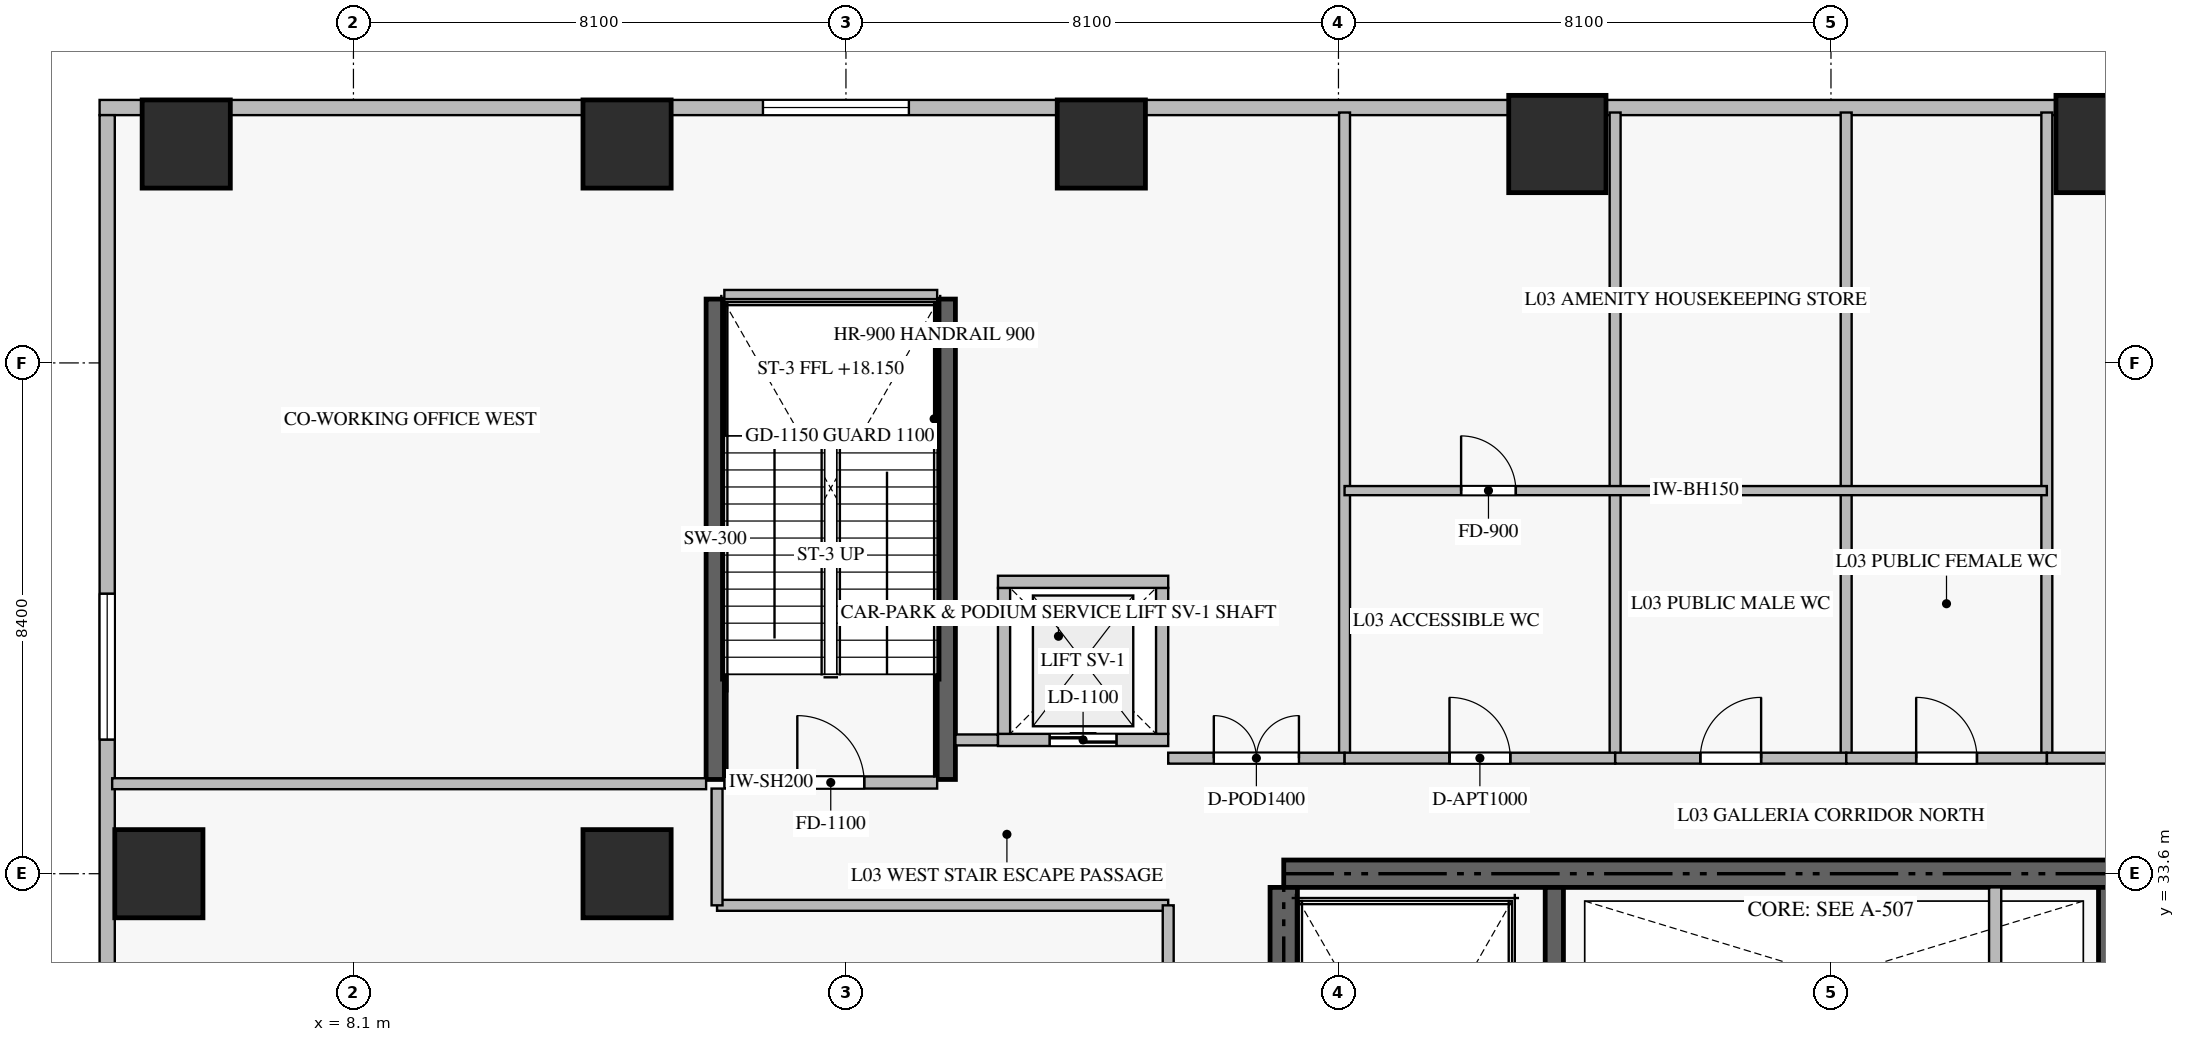
"""IFC4 building model, lengths in metres.
Left out: names, types, materials, properties, quantities, classifications, styles, units other than length and angle.
Written with IfcOpenShell. Run it as: python <this file> out.ifc"""

import sys

from ifc_helpers import new_model, si_unit, direction, frame, frame_2d, origin, origin_2d, place, context, subcontext, project, spatial, rectangle, extrude, source, transform, mapped, element, fill, save


model = new_model("IFC4")
c1 = context("Model", 3, precision=1e-05, world=origin(), true_north=direction((0.0, 1.0)))
c2 = subcontext(c1, "Body", "Model", "MODEL_VIEW")
j1 = project(units=[si_unit("LENGTHUNIT", "METRE"), si_unit("PLANEANGLEUNIT", "RADIAN")], contexts=[c1])
p1 = place(None, origin())
s1 = spatial("IfcSite", under=j1, at=p1, CompositionType="ELEMENT")
p2 = place(p1, origin())
s2 = spatial("IfcBuilding", under=s1, at=p2, CompositionType="ELEMENT")
p3 = place(p2, frame((0.0, 0.0, 15.3)))
s3 = spatial("IfcBuildingStorey", under=s2, at=p3, CompositionType="ELEMENT", Elevation=15.3)
p4 = place(p3, frame((41.4, 33.6, -0.38), z_axis=(0.0, 0.0, 1.0), x_axis=(-1.0, 0.0, 0.0)))
e1 = element("IfcWall", 1, at=p4, inside=s3, PredefinedType="SHEAR", context=c2, shape_type="SweptSolid", body=[
    extrude(rectangle(XDim=18.0, YDim=0.45, at=frame_2d((9.0, 0.0))), origin(), (0.0, 0.0, 1.0), 5.228),
])
p5 = place(p3, frame((23.4, 24.25, -0.38), z_axis=(0.0, 0.0, 1.0), x_axis=(0.0, 1.0, 0.0)))
e2 = element("IfcWall", 2, at=p5, inside=s3, PredefinedType="SHEAR", context=c2, shape_type="SweptSolid", body=[
    extrude(rectangle(XDim=9.125, YDim=0.45, at=frame_2d((4.562, 0.0))), origin(), (0.0, 0.0, 1.0), 5.228),
])
p6 = place(p3, frame((27.85, 23.55, -0.38), z_axis=(0.0, 0.0, 1.0), x_axis=(0.0, 1.0, 0.0)))
e3 = element("IfcWall", 3, at=p6, inside=s3, PredefinedType="SHEAR", context=c2, shape_type="SweptSolid", body=[
    extrude(rectangle(XDim=9.825, YDim=0.3, at=frame_2d((4.913, 0.0))), origin(), (0.0, 0.0, 1.0), 5.228),
])
p7 = place(p3, frame((36.95, 27.05, -0.38), z_axis=(0.0, 0.0, 1.0), x_axis=(0.0, 1.0, 0.0)))
e4 = element("IfcWall", 4, at=p7, inside=s3, PredefinedType="SHEAR", context=c2, shape_type="SweptSolid", body=[
    extrude(rectangle(XDim=6.325, YDim=0.3, at=frame_2d((3.163, 0.0))), origin(), (0.0, 0.0, 1.0), 5.228),
])
m1 = source(origin(), c2, "Body", "SweptSolid", [
    extrude(rectangle(XDim=1.45, YDim=1.45, at=origin_2d()), origin(), (0.0, 0.0, 1.0), 5.23),
])
for number, where, z_axis, x_axis in (
    (5, (12.6, 45.6, -0.38), (0.0, 0.0, 1.0), (1.0, 0.0, 0.0)),
    (6, (20.4, 45.6, -0.38), (0.0, 0.0, 1.0), (1.0, 0.0, 0.0)),
):
    element("IfcColumn", number, at=place(p3, frame(where, z_axis=z_axis, x_axis=x_axis)), inside=s3, PredefinedType="COLUMN", context=c2, shape_type="MappedRepresentation", body=[
        mapped(m1, transform((0.0, 0.0, 0.0), scale=1.0)),
    ])
m2 = source(origin(), c2, "Body", "SweptSolid", [
    extrude(rectangle(XDim=1.6, YDim=1.6, at=origin_2d()), origin(), (0.0, 0.0, 1.0), 5.23),
])
for number, where, z_axis, x_axis in (
    (7, (27.9, 45.6, -0.38), (0.0, 0.0, 1.0), (1.0, 0.0, 0.0)),
    (8, (36.9, 45.6, -0.38), (0.0, 0.0, 1.0), (1.0, 0.0, 0.0)),
):
    element("IfcColumn", number, at=place(p3, frame(where, z_axis=z_axis, x_axis=x_axis)), inside=s3, PredefinedType="COLUMN", context=c2, shape_type="MappedRepresentation", body=[
        mapped(m2, transform((0.0, 0.0, 0.0), scale=1.0)),
    ])
for number, where, z_axis, x_axis in (
    (9, (12.6, 33.6, -0.38), (0.0, 0.0, 1.0), (1.0, 0.0, 0.0)),
    (10, (4.9, 33.6, -0.38), (0.0, 0.0, 1.0), (1.0, 0.0, 0.0)),
    (11, (5.35, 45.6, -0.38), (0.0, 0.0, 1.0), (1.0, 0.0, 0.0)),
):
    element("IfcColumn", number, at=place(p3, frame(where, z_axis=z_axis, x_axis=x_axis)), inside=s3, PredefinedType="COLUMN", context=c2, shape_type="MappedRepresentation", body=[
        mapped(m1, transform((0.0, 0.0, 0.0), scale=1.0)),
    ])
p8 = place(p3, frame((60.875, 46.2, 0.0), z_axis=(0.0, 0.0, 1.0), x_axis=(-1.0, 0.0, 0.0)))
e12 = element("IfcWall", 12, at=p8, inside=s3, PredefinedType="ELEMENTEDWALL", context=c2, shape_type="SweptSolid", body=[
    extrude(rectangle(XDim=56.95, YDim=0.25, at=frame_2d((28.475, 0.0))), origin(), (0.0, 0.0, 1.0), 4.835),
])
p9 = place(p8, frame((10.91, 0.0, 0.6)))
e13 = element("IfcOpeningElement", 13, at=p9, cuts=e12, PredefinedType="OPENING", context=c2, shape_type="SweptSolid", body=[
    extrude(rectangle(XDim=2.4, YDim=2.6, at=frame_2d((1.2, 1.3))), frame((0.0, 0.135, 0.0), z_axis=(0.0, -1.0, 0.0), x_axis=(1.0, 0.0, 0.0)), (0.0, 0.0, 1.0), 0.27),
])
p10 = place(p8, frame((43.64, 0.0, 0.6)))
e14 = element("IfcOpeningElement", 14, at=p10, cuts=e12, PredefinedType="OPENING", context=c2, shape_type="SweptSolid", body=[
    extrude(rectangle(XDim=2.4, YDim=2.6, at=frame_2d((1.2, 1.3))), frame((0.0, 0.135, 0.0), z_axis=(0.0, -1.0, 0.0), x_axis=(1.0, 0.0, 0.0)), (0.0, 0.0, 1.0), 0.27),
])
p11 = place(p3, frame((4.05, 46.075, 0.0), z_axis=(0.0, 0.0, 1.0), x_axis=(0.0, -1.0, 0.0)))
e15 = element("IfcWall", 15, at=p11, inside=s3, PredefinedType="ELEMENTEDWALL", context=c2, shape_type="SweptSolid", body=[
    extrude(rectangle(XDim=41.75, YDim=0.25, at=frame_2d((20.875, 0.0))), origin(), (0.0, 0.0, 1.0), 4.835),
])
p12 = place(p11, frame((7.87, 0.0, 0.6)))
e16 = element("IfcOpeningElement", 16, at=p12, cuts=e15, PredefinedType="OPENING", context=c2, shape_type="SweptSolid", body=[
    extrude(rectangle(XDim=2.4, YDim=2.6, at=frame_2d((1.2, 1.3))), frame((0.0, 0.135, 0.0), z_axis=(0.0, -1.0, 0.0), x_axis=(1.0, 0.0, 0.0)), (0.0, 0.0, 1.0), 0.27),
])
p13 = place(p11, frame((24.397, 0.0, 0.6)))
e17 = element("IfcOpeningElement", 17, at=p13, cuts=e15, PredefinedType="OPENING", context=c2, shape_type="SweptSolid", body=[
    extrude(rectangle(XDim=2.4, YDim=2.6, at=frame_2d((1.2, 1.3))), frame((0.0, 0.135, 0.0), z_axis=(0.0, -1.0, 0.0), x_axis=(1.0, 0.0, 0.0)), (0.0, 0.0, 1.0), 0.27),
])
for number, where, z_axis, x_axis in (
    (18, (14.05, 35.15, -0.38), (0.0, 0.0, 1.0), (0.0, 1.0, 0.0)),
    (19, (17.85, 35.15, -0.38), (0.0, 0.0, 1.0), (0.0, 1.0, 0.0)),
):
    element("IfcWall", number, at=place(p3, frame(where, z_axis=z_axis, x_axis=x_axis)), inside=s3, PredefinedType="SHEAR", context=c2, shape_type="SweptSolid", body=[
        extrude(rectangle(XDim=7.9, YDim=0.3, at=frame_2d((3.95, 0.0))), origin(), (0.0, 0.0, 1.0), 5.228),
    ])
p14 = place(p3, frame((14.2, 35.1, 0.0), z_axis=(0.0, 0.0, 1.0), x_axis=(1.0, 0.0, 0.0)))
e20 = element("IfcWall", 20, at=p14, inside=s3, PredefinedType="STANDARD", context=c2, shape_type="SweptSolid", body=[
    extrude(rectangle(XDim=3.5, YDim=0.2, at=frame_2d((1.75, 0.0))), origin(), (0.0, 0.0, 1.0), 4.85),
])
p15 = place(p14, frame((1.2, 0.0, 0.0)))
e21 = element("IfcOpeningElement", 21, at=p15, cuts=e20, PredefinedType="OPENING", context=c2, shape_type="SweptSolid", body=[
    extrude(rectangle(XDim=1.1, YDim=2.15, at=frame_2d((0.55, 1.075))), frame((0.0, 0.11, 0.0), z_axis=(0.0, -1.0, 0.0), x_axis=(1.0, 0.0, 0.0)), (0.0, 0.0, 1.0), 0.22),
])
p16 = place(p3, frame((14.2, 43.1, 0.0), z_axis=(0.0, 0.0, 1.0), x_axis=(1.0, 0.0, 0.0)))
e22 = element("IfcWall", 22, at=p16, inside=s3, PredefinedType="STANDARD", context=c2, shape_type="SweptSolid", body=[
    extrude(rectangle(XDim=3.5, YDim=0.2, at=frame_2d((1.75, 0.0))), origin(), (0.0, 0.0, 1.0), 2.335),
])
p17 = place(p3, frame((35.1, 30.75, 0.0), z_axis=(0.0, 0.0, 1.0), x_axis=(0.0, 1.0, 0.0)))
e23 = element("IfcWall", 23, at=p17, inside=s3, PredefinedType="STANDARD", context=c2, shape_type="SweptSolid", body=[
    extrude(rectangle(XDim=2.625, YDim=0.2, at=frame_2d((1.312, 0.0))), origin(), (0.0, 0.0, 1.0), 4.85),
])
p18 = place(p3, frame((18.7, 35.8, 0.0), z_axis=(0.0, 0.0, 1.0), x_axis=(1.0, 0.0, 0.0)))
e24 = element("IfcWall", 24, at=p18, inside=s3, PredefinedType="STANDARD", context=c2, shape_type="SweptSolid", body=[
    extrude(rectangle(XDim=2.8, YDim=0.2, at=frame_2d((1.4, 0.0))), origin(), (0.0, 0.0, 1.0), 4.85),
])
p19 = place(p18, frame((0.85, 0.0, 0.0)))
e25 = element("IfcOpeningElement", 25, at=p19, cuts=e24, PredefinedType="OPENING", context=c2, shape_type="SweptSolid", body=[
    extrude(rectangle(XDim=1.1, YDim=2.2, at=frame_2d((0.55, 1.1))), frame((0.0, 0.11, 0.0), z_axis=(0.0, -1.0, 0.0), x_axis=(1.0, 0.0, 0.0)), (0.0, 0.0, 1.0), 0.22),
])
for number, where, z_axis, x_axis in (
    (26, (18.8, 35.9, 0.0), (0.0, 0.0, 1.0), (0.0, 1.0, 0.0)),
    (27, (21.4, 35.9, 0.0), (0.0, 0.0, 1.0), (0.0, 1.0, 0.0)),
):
    element("IfcWall", number, at=place(p3, frame(where, z_axis=z_axis, x_axis=x_axis)), inside=s3, PredefinedType="STANDARD", context=c2, shape_type="SweptSolid", body=[
        extrude(rectangle(XDim=2.4, YDim=0.2, at=frame_2d((1.2, 0.0))), origin(), (0.0, 0.0, 1.0), 4.85),
    ])
p20 = place(p3, frame((18.7, 38.4, 0.0), z_axis=(0.0, 0.0, 1.0), x_axis=(1.0, 0.0, 0.0)))
e28 = element("IfcWall", 28, at=p20, inside=s3, PredefinedType="STANDARD", context=c2, shape_type="SweptSolid", body=[
    extrude(rectangle(XDim=2.8, YDim=0.2, at=frame_2d((1.4, 0.0))), origin(), (0.0, 0.0, 1.0), 4.85),
])
p21 = place(p3, frame((4.132, 35.08, 0.0), z_axis=(0.0, 0.0, 1.0), x_axis=(1.0, 0.0, 0.0)))
e29 = element("IfcWall", 29, at=p21, inside=s3, PredefinedType="PARTITIONING", context=c2, shape_type="SweptSolid", body=[
    extrude(rectangle(XDim=9.768, YDim=0.18, at=frame_2d((4.884, 0.0))), origin(), (0.0, 0.0, 1.0), 4.85),
])
p22 = place(p3, frame((14.08, 33.08, 0.0), z_axis=(0.0, 0.0, 1.0), x_axis=(1.0, 0.0, 0.0)))
e30 = element("IfcWall", 30, at=p22, inside=s3, PredefinedType="PARTITIONING", context=c2, shape_type="SweptSolid", body=[
    extrude(rectangle(XDim=7.42, YDim=0.18, at=frame_2d((3.71, 0.0))), origin(), (0.0, 0.0, 1.0), 4.85),
])
p23 = place(p3, frame((18.0, 35.8, 0.0), z_axis=(0.0, 0.0, 1.0), x_axis=(1.0, 0.0, 0.0)))
e31 = element("IfcWall", 31, at=p23, inside=s3, PredefinedType="PARTITIONING", context=c2, shape_type="SweptSolid", body=[
    extrude(rectangle(XDim=0.698, YDim=0.18, at=frame_2d((0.349, 0.0))), origin(), (0.0, 0.0, 1.0), 4.85),
])
p24 = place(p3, frame((14.08, 33.08, 0.0), z_axis=(0.0, 0.0, 1.0), x_axis=(0.0, 1.0, 0.0)))
e32 = element("IfcWall", 32, at=p24, inside=s3, PredefinedType="PARTITIONING", context=c2, shape_type="SweptSolid", body=[
    extrude(rectangle(XDim=1.92, YDim=0.18, at=frame_2d((0.96, 0.0))), origin(), (0.0, 0.0, 1.0), 4.85),
])
p25 = place(p3, frame((21.5, 14.9, 0.0), z_axis=(0.0, 0.0, 1.0), x_axis=(0.0, 1.0, 0.0)))
e33 = element("IfcWall", 33, at=p25, inside=s3, PredefinedType="PARTITIONING", context=c2, shape_type="SweptSolid", body=[
    extrude(rectangle(XDim=18.18, YDim=0.18, at=frame_2d((9.09, 0.0))), origin(), (0.0, 0.0, 1.0), 4.85),
])
p26 = place(p25, frame((8.34, 0.0, 0.0)))
e34 = element("IfcOpeningElement", 34, at=p26, cuts=e33, PredefinedType="OPENING", context=c2, shape_type="SweptSolid", body=[
    extrude(rectangle(XDim=1.5, YDim=2.25, at=frame_2d((0.75, 1.125))), frame((0.0, 0.1, 0.0), z_axis=(0.0, -1.0, 0.0), x_axis=(1.0, 0.0, 0.0)), (0.0, 0.0, 1.0), 0.2),
])
for number, where, z_axis, x_axis in (
    (35, (24.4, 35.5, 0.0), (0.0, 0.0, 1.0), (0.0, 1.0, 0.0)),
    (36, (28.85, 35.5, 0.0), (0.0, 0.0, 1.0), (0.0, 1.0, 0.0)),
    (37, (32.65, 35.5, 0.0), (0.0, 0.0, 1.0), (0.0, 1.0, 0.0)),
    (38, (35.95, 35.5, 0.0), (0.0, 0.0, 1.0), (0.0, 1.0, 0.0)),
):
    element("IfcWall", number, at=place(p3, frame(where, z_axis=z_axis, x_axis=x_axis)), inside=s3, PredefinedType="PARTITIONING", context=c2, shape_type="SweptSolid", body=[
        extrude(rectangle(XDim=10.618, YDim=0.18, at=frame_2d((5.309, 0.0))), origin(), (0.0, 0.0, 1.0), 4.85),
    ])
p27 = place(p3, frame((21.5, 35.5, 0.0), z_axis=(0.0, 0.0, 1.0), x_axis=(1.0, 0.0, 0.0)))
e39 = element("IfcWall", 39, at=p27, inside=s3, PredefinedType="PARTITIONING", context=c2, shape_type="SweptSolid", body=[
    extrude(rectangle(XDim=2.9, YDim=0.18, at=frame_2d((1.45, 0.0))), origin(), (0.0, 0.0, 1.0), 4.85),
])
p28 = place(p27, frame((0.75, 0.0, 0.0)))
e40 = element("IfcOpeningElement", 40, at=p28, cuts=e39, PredefinedType="OPENING", context=c2, shape_type="SweptSolid", body=[
    extrude(rectangle(XDim=1.4, YDim=2.25, at=frame_2d((0.7, 1.125))), frame((0.0, 0.1, 0.0), z_axis=(0.0, -1.0, 0.0), x_axis=(1.0, 0.0, 0.0)), (0.0, 0.0, 1.0), 0.2),
])
p29 = place(p3, frame((24.402, 35.5, 0.0), z_axis=(0.0, 0.0, 1.0), x_axis=(1.0, 0.0, 0.0)))
e41 = element("IfcWall", 41, at=p29, inside=s3, PredefinedType="PARTITIONING", context=c2, shape_type="SweptSolid", body=[
    extrude(rectangle(XDim=4.448, YDim=0.18, at=frame_2d((2.224, 0.0))), origin(), (0.0, 0.0, 1.0), 4.85),
])
p30 = place(p29, frame((1.724, 0.0, 0.0)))
e42 = element("IfcOpeningElement", 42, at=p30, cuts=e41, PredefinedType="OPENING", context=c2, shape_type="SweptSolid", body=[
    extrude(rectangle(XDim=1.0, YDim=2.15, at=frame_2d((0.5, 1.075))), frame((0.0, 0.1, 0.0), z_axis=(0.0, -1.0, 0.0), x_axis=(1.0, 0.0, 0.0)), (0.0, 0.0, 1.0), 0.2),
])
p31 = place(p3, frame((28.852, 35.5, 0.0), z_axis=(0.0, 0.0, 1.0), x_axis=(1.0, 0.0, 0.0)))
e43 = element("IfcWall", 43, at=p31, inside=s3, PredefinedType="PARTITIONING", context=c2, shape_type="SweptSolid", body=[
    extrude(rectangle(XDim=3.798, YDim=0.18, at=frame_2d((1.899, 0.0))), origin(), (0.0, 0.0, 1.0), 4.85),
])
p32 = place(p31, frame((1.399, 0.0, 0.0)))
e44 = element("IfcOpeningElement", 44, at=p32, cuts=e43, PredefinedType="OPENING", context=c2, shape_type="SweptSolid", body=[
    extrude(rectangle(XDim=1.0, YDim=2.15, at=frame_2d((0.5, 1.075))), frame((0.0, 0.1, 0.0), z_axis=(0.0, -1.0, 0.0), x_axis=(1.0, 0.0, 0.0)), (0.0, 0.0, 1.0), 0.2),
])
p33 = place(p3, frame((32.652, 35.5, 0.0), z_axis=(0.0, 0.0, 1.0), x_axis=(1.0, 0.0, 0.0)))
e45 = element("IfcWall", 45, at=p33, inside=s3, PredefinedType="PARTITIONING", context=c2, shape_type="SweptSolid", body=[
    extrude(rectangle(XDim=3.298, YDim=0.18, at=frame_2d((1.649, 0.0))), origin(), (0.0, 0.0, 1.0), 4.85),
])
p34 = place(p33, frame((1.149, 0.0, 0.0)))
e46 = element("IfcOpeningElement", 46, at=p34, cuts=e45, PredefinedType="OPENING", context=c2, shape_type="SweptSolid", body=[
    extrude(rectangle(XDim=1.0, YDim=2.15, at=frame_2d((0.5, 1.075))), frame((0.0, 0.1, 0.0), z_axis=(0.0, -1.0, 0.0), x_axis=(1.0, 0.0, 0.0)), (0.0, 0.0, 1.0), 0.2),
])
p35 = place(p3, frame((35.952, 35.5, 0.0), z_axis=(0.0, 0.0, 1.0), x_axis=(1.0, 0.0, 0.0)))
e47 = element("IfcWall", 47, at=p35, inside=s3, PredefinedType="PARTITIONING", context=c2, shape_type="SweptSolid", body=[
    extrude(rectangle(XDim=7.348, YDim=0.18, at=frame_2d((3.674, 0.0))), origin(), (0.0, 0.0, 1.0), 4.85),
])
p36 = place(p35, frame((2.974, 0.0, 0.0)))
e48 = element("IfcOpeningElement", 48, at=p36, cuts=e47, PredefinedType="OPENING", context=c2, shape_type="SweptSolid", body=[
    extrude(rectangle(XDim=1.4, YDim=2.25, at=frame_2d((0.7, 1.125))), frame((0.0, 0.1, 0.0), z_axis=(0.0, -1.0, 0.0), x_axis=(1.0, 0.0, 0.0)), (0.0, 0.0, 1.0), 0.2),
])
p37 = place(p3, frame((24.4, 39.9, 0.0), z_axis=(0.0, 0.0, 1.0), x_axis=(1.0, 0.0, 0.0)))
e49 = element("IfcWall", 49, at=p37, inside=s3, PredefinedType="PARTITIONING", context=c2, shape_type="SweptSolid", body=[
    extrude(rectangle(XDim=11.55, YDim=0.15, at=frame_2d((5.775, 0.0))), origin(), (0.0, 0.0, 1.0), 4.85),
])
p38 = place(p37, frame((1.917, 0.0, 0.0)))
e50 = element("IfcOpeningElement", 50, at=p38, cuts=e49, PredefinedType="OPENING", context=c2, shape_type="SweptSolid", body=[
    extrude(rectangle(XDim=0.9, YDim=2.1, at=frame_2d((0.45, 1.05))), frame((0.0, 0.085, 0.0), z_axis=(0.0, -1.0, 0.0), x_axis=(1.0, 0.0, 0.0)), (0.0, 0.0, 1.0), 0.17),
])
m3 = source(origin(), c2, "Body", "SweptSolid", [
    extrude(rectangle(XDim=2.4, YDim=2.6, at=frame_2d((1.2, 1.3))), frame((0.0, 0.03, 0.0), z_axis=(0.0, -1.0, 0.0), x_axis=(1.0, 0.0, 0.0)), (0.0, 0.0, 1.0), 0.06),
])
p39 = place(p10, origin())
e51 = element("IfcWindow", 51, at=p39, inside=s3, PartitioningType="SINGLE_PANEL", PredefinedType="WINDOW", context=c2, shape_type="MappedRepresentation", body=[
    mapped(m3, transform((0.0, 0.0, 0.0), scale=1.0)),
])
fill(e14, e51)
p40 = place(p12, origin())
e52 = element("IfcWindow", 52, at=p40, inside=s3, PartitioningType="SINGLE_PANEL", PredefinedType="WINDOW", context=c2, shape_type="MappedRepresentation", body=[
    mapped(m3, transform((0.0, 0.0, 0.0), scale=1.0)),
])
fill(e16, e52)
m4 = source(origin(), c2, "Body", "SweptSolid", [
    extrude(rectangle(XDim=1.1, YDim=2.15, at=frame_2d((0.55, 1.075))), frame((0.0, 0.025, 0.0), z_axis=(0.0, -1.0, 0.0), x_axis=(1.0, 0.0, 0.0)), (0.0, 0.0, 1.0), 0.05),
])
p41 = place(p15, origin())
e53 = element("IfcDoor", 53, at=p41, inside=s3, OperationType="SINGLE_SWING_LEFT", PredefinedType="DOOR", context=c2, shape_type="MappedRepresentation", body=[
    mapped(m4, transform((0.0, 0.0, 0.0), scale=1.0)),
])
fill(e21, e53)
m5 = source(origin(), c2, "Body", "SweptSolid", [
    extrude(rectangle(XDim=1.1, YDim=2.2, at=frame_2d((0.55, 1.1))), frame((0.0, 0.025, 0.0), z_axis=(0.0, -1.0, 0.0), x_axis=(1.0, 0.0, 0.0)), (0.0, 0.0, 1.0), 0.05),
])
p42 = place(p19, origin())
e54 = element("IfcDoor", 54, at=p42, inside=s3, OperationType="DOUBLE_DOOR_SLIDING", PredefinedType="DOOR", context=c2, shape_type="MappedRepresentation", body=[
    mapped(m5, transform((0.0, 0.0, 0.0), scale=1.0)),
])
fill(e25, e54)
m6 = source(origin(), c2, "Body", "SweptSolid", [
    extrude(rectangle(XDim=1.4, YDim=2.25, at=frame_2d((0.7, 1.125))), frame((0.0, 0.025, 0.0), z_axis=(0.0, -1.0, 0.0), x_axis=(1.0, 0.0, 0.0)), (0.0, 0.0, 1.0), 0.05),
])
p43 = place(p28, origin())
e55 = element("IfcDoor", 55, at=p43, inside=s3, OperationType="DOUBLE_DOOR_SINGLE_SWING", PredefinedType="DOOR", context=c2, shape_type="MappedRepresentation", body=[
    mapped(m6, transform((0.0, 0.0, 0.0), scale=1.0)),
])
fill(e40, e55)
m7 = source(origin(), c2, "Body", "SweptSolid", [
    extrude(rectangle(XDim=1.0, YDim=2.15, at=frame_2d((0.5, 1.075))), frame((0.0, 0.025, 0.0), z_axis=(0.0, -1.0, 0.0), x_axis=(1.0, 0.0, 0.0)), (0.0, 0.0, 1.0), 0.05),
])
p44 = place(p30, origin())
e56 = element("IfcDoor", 56, at=p44, inside=s3, OperationType="SINGLE_SWING_LEFT", PredefinedType="DOOR", context=c2, shape_type="MappedRepresentation", body=[
    mapped(m7, transform((0.0, 0.0, 0.0), scale=1.0)),
])
fill(e42, e56)
p45 = place(p32, origin())
e57 = element("IfcDoor", 57, at=p45, inside=s3, OperationType="SINGLE_SWING_RIGHT", PredefinedType="DOOR", context=c2, shape_type="MappedRepresentation", body=[
    mapped(m7, transform((0.0, 0.0, 0.0), scale=1.0)),
])
fill(e44, e57)
p46 = place(p34, origin())
e58 = element("IfcDoor", 58, at=p46, inside=s3, OperationType="SINGLE_SWING_LEFT", PredefinedType="DOOR", context=c2, shape_type="MappedRepresentation", body=[
    mapped(m7, transform((0.0, 0.0, 0.0), scale=1.0)),
])
fill(e46, e58)
m8 = source(origin(), c2, "Body", "SweptSolid", [
    extrude(rectangle(XDim=0.9, YDim=2.1, at=frame_2d((0.45, 1.05))), frame((0.0, 0.025, 0.0), z_axis=(0.0, -1.0, 0.0), x_axis=(1.0, 0.0, 0.0)), (0.0, 0.0, 1.0), 0.05),
])
p47 = place(p38, origin())
e59 = element("IfcDoor", 59, at=p47, inside=s3, OperationType="SINGLE_SWING_LEFT", PredefinedType="DOOR", context=c2, shape_type="MappedRepresentation", body=[
    mapped(m8, transform((0.0, 0.0, 0.0), scale=1.0)),
])
fill(e50, e59)
save(model, sys.argv[1])
